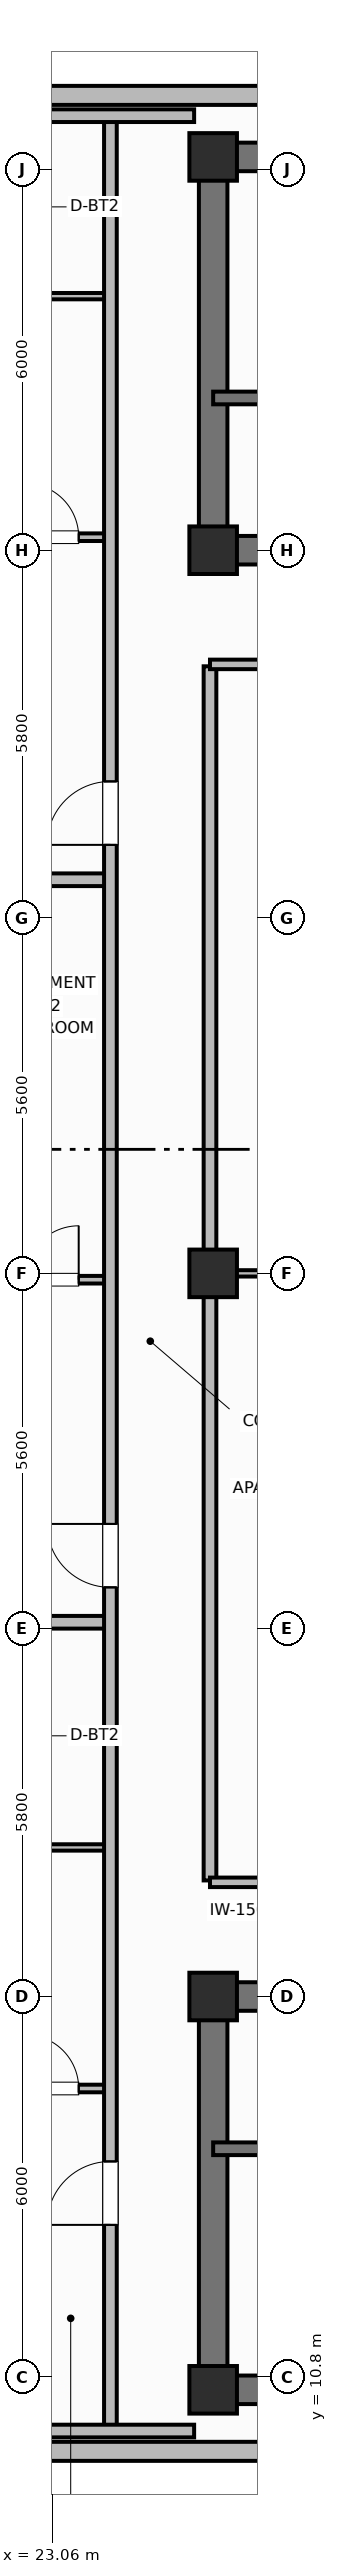
"""IFC4 building model, lengths in metres.
Left out: names, types, materials, properties, quantities, classifications, styles, units other than length and angle.
Written with IfcOpenShell. Run it as: python <this file> out.ifc"""

import sys

from ifc_helpers import new_model, si_unit, direction, frame, frame_2d, origin, origin_2d, place, context, subcontext, project, spatial, rectangle, extrude, element, fill, save


model = new_model("IFC4")
c1 = context("Model", 3, precision=1e-05, world=origin(), true_north=direction((0.0, 1.0)))
c2 = subcontext(c1, "Body", "Model", "MODEL_VIEW")
j1 = project(units=[si_unit("LENGTHUNIT", "METRE"), si_unit("PLANEANGLEUNIT", "RADIAN")], contexts=[c1])
p1 = place(None, origin())
s1 = spatial("IfcSite", under=j1, at=p1, CompositionType="ELEMENT")
p2 = place(p1, origin())
s2 = spatial("IfcBuilding", under=s1, at=p2, CompositionType="ELEMENT")
p3 = place(p2, frame((0.0, 0.0, 282.4)))
s3 = spatial("IfcBuildingStorey", under=s2, at=p3, CompositionType="ELEMENT", Elevation=282.4)
p4 = place(p3, frame((52.8, 10.6, 0.0), z_axis=(0.0, 0.0, 1.0), x_axis=(-1.0, 0.0, 0.0)))
e1 = element("IfcWall", 1, at=p4, inside=s3, PredefinedType="SHEAR", context=c2, shape_type="SweptSolid", body=[
    extrude(rectangle(XDim=27.2, YDim=0.45, at=frame_2d((13.6, 0.0))), origin(), (0.0, 0.0, 1.0), 3.7),
])
p5 = place(p3, frame((25.6, 10.825, 0.0), z_axis=(0.0, 0.0, 1.0), x_axis=(0.0, 1.0, 0.0)))
e2 = element("IfcWall", 2, at=p5, inside=s3, PredefinedType="SHEAR", context=c2, shape_type="SweptSolid", body=[
    extrude(rectangle(XDim=5.75, YDim=0.45, at=frame_2d((2.875, 0.0))), origin(), (0.0, 0.0, 1.0), 3.7),
])
p6 = place(p3, frame((25.6, 16.8, 0.0), z_axis=(0.0, 0.0, 1.0), x_axis=(1.0, 0.0, 0.0)))
e3 = element("IfcWall", 3, at=p6, inside=s3, PredefinedType="SHEAR", context=c2, shape_type="SweptSolid", body=[
    extrude(rectangle(XDim=27.2, YDim=0.45, at=frame_2d((13.6, 0.0))), origin(), (0.0, 0.0, 1.0), 3.7),
])
p7 = place(p6, frame((1.9, 0.0, 0.0)))
e4 = element("IfcOpeningElement", 4, at=p7, cuts=e3, PredefinedType="OPENING", context=c2, shape_type="SweptSolid", body=[
    extrude(rectangle(XDim=1.1, YDim=2.15, at=frame_2d((0.55, 1.075))), frame((0.0, 0.235, 0.0), z_axis=(0.0, -1.0, 0.0), x_axis=(1.0, 0.0, 0.0)), (0.0, 0.0, 1.0), 0.47),
])
p8 = place(p6, frame((13.0, 0.0, 0.0)))
e5 = element("IfcOpeningElement", 5, at=p8, cuts=e3, PredefinedType="OPENING", context=c2, shape_type="SweptSolid", body=[
    extrude(rectangle(XDim=1.2, YDim=2.15, at=frame_2d((0.6, 1.075))), frame((0.0, 0.235, 0.0), z_axis=(0.0, -1.0, 0.0), x_axis=(1.0, 0.0, 0.0)), (0.0, 0.0, 1.0), 0.47),
])
p9 = place(p6, frame((21.6, 0.0, 0.0)))
e6 = element("IfcOpeningElement", 6, at=p9, cuts=e3, PredefinedType="OPENING", context=c2, shape_type="SweptSolid", body=[
    extrude(rectangle(XDim=1.0, YDim=2.15, at=frame_2d((0.5, 1.075))), frame((0.0, 0.235, 0.0), z_axis=(0.0, -1.0, 0.0), x_axis=(1.0, 0.0, 0.0)), (0.0, 0.0, 1.0), 0.47),
])
p10 = place(p3, frame((25.6, 45.8, 0.0), z_axis=(0.0, 0.0, 1.0), x_axis=(1.0, 0.0, 0.0)))
e7 = element("IfcWall", 7, at=p10, inside=s3, PredefinedType="SHEAR", context=c2, shape_type="SweptSolid", body=[
    extrude(rectangle(XDim=27.2, YDim=0.45, at=frame_2d((13.6, 0.0))), origin(), (0.0, 0.0, 1.0), 3.7),
])
p11 = place(p3, frame((25.6, 39.825, 0.0), z_axis=(0.0, 0.0, 1.0), x_axis=(0.0, 1.0, 0.0)))
e8 = element("IfcWall", 8, at=p11, inside=s3, PredefinedType="SHEAR", context=c2, shape_type="SweptSolid", body=[
    extrude(rectangle(XDim=5.75, YDim=0.45, at=frame_2d((2.875, 0.0))), origin(), (0.0, 0.0, 1.0), 3.7),
])
p12 = place(p3, frame((52.8, 39.6, 0.0), z_axis=(0.0, 0.0, 1.0), x_axis=(-1.0, 0.0, 0.0)))
e9 = element("IfcWall", 9, at=p12, inside=s3, PredefinedType="SHEAR", context=c2, shape_type="SweptSolid", body=[
    extrude(rectangle(XDim=27.2, YDim=0.45, at=frame_2d((13.6, 0.0))), origin(), (0.0, 0.0, 1.0), 3.7),
])
p13 = place(p12, frame((24.2, 0.0, 0.0)))
e10 = element("IfcOpeningElement", 10, at=p13, cuts=e9, PredefinedType="OPENING", context=c2, shape_type="SweptSolid", body=[
    extrude(rectangle(XDim=1.1, YDim=2.15, at=frame_2d((0.55, 1.075))), frame((0.0, 0.235, 0.0), z_axis=(0.0, -1.0, 0.0), x_axis=(1.0, 0.0, 0.0)), (0.0, 0.0, 1.0), 0.47),
])
p14 = place(p12, frame((15.1, 0.0, 0.0)))
e11 = element("IfcOpeningElement", 11, at=p14, cuts=e9, PredefinedType="OPENING", context=c2, shape_type="SweptSolid", body=[
    extrude(rectangle(XDim=1.2, YDim=2.15, at=frame_2d((0.6, 1.075))), frame((0.0, 0.235, 0.0), z_axis=(0.0, -1.0, 0.0), x_axis=(1.0, 0.0, 0.0)), (0.0, 0.0, 1.0), 0.47),
])
p15 = place(p12, frame((11.6, 0.0, 0.0)))
e12 = element("IfcOpeningElement", 12, at=p15, cuts=e9, PredefinedType="OPENING", context=c2, shape_type="SweptSolid", body=[
    extrude(rectangle(XDim=0.9, YDim=2.1, at=frame_2d((0.45, 1.05))), frame((0.0, 0.235, 0.0), z_axis=(0.0, -1.0, 0.0), x_axis=(1.0, 0.0, 0.0)), (0.0, 0.0, 1.0), 0.47),
])
p16 = place(p12, frame((7.35, 0.0, 0.0)))
e13 = element("IfcOpeningElement", 13, at=p16, cuts=e9, PredefinedType="OPENING", context=c2, shape_type="SweptSolid", body=[
    extrude(rectangle(XDim=0.85, YDim=2.1, at=frame_2d((0.425, 1.05))), frame((0.0, 0.235, 0.0), z_axis=(0.0, -1.0, 0.0), x_axis=(1.0, 0.0, 0.0)), (0.0, 0.0, 1.0), 0.47),
])
p17 = place(p12, frame((4.2, 0.0, 0.0)))
e14 = element("IfcOpeningElement", 14, at=p17, cuts=e9, PredefinedType="OPENING", context=c2, shape_type="SweptSolid", body=[
    extrude(rectangle(XDim=1.3, YDim=2.2, at=frame_2d((0.65, 1.1))), frame((0.0, 0.235, 0.0), z_axis=(0.0, -1.0, 0.0), x_axis=(1.0, 0.0, 0.0)), (0.0, 0.0, 1.0), 0.47),
])
for number, where, z_axis, x_axis in (
    (15, (25.6, 10.6, 0.0), (0.0, 0.0, 1.0), (1.0, 0.0, 0.0)),
    (16, (25.6, 16.8, 0.0), (0.0, 0.0, 1.0), (1.0, 0.0, 0.0)),
    (17, (25.6, 39.6, 0.0), (0.0, 0.0, 1.0), (1.0, 0.0, 0.0)),
    (18, (25.6, 45.8, 0.0), (0.0, 0.0, 1.0), (1.0, 0.0, 0.0)),
    (19, (25.6, 28.2, 0.0), (0.0, 0.0, 1.0), (1.0, 0.0, 0.0)),
):
    element("IfcColumn", number, at=place(p3, frame(where, z_axis=z_axis, x_axis=x_axis)), inside=s3, PredefinedType="COLUMN", context=c2, shape_type="SweptSolid", body=[
        extrude(rectangle(XDim=0.75, YDim=0.75, at=origin_2d()), origin(), (0.0, 0.0, 1.0), 3.7),
    ])
p18 = place(p3, frame((22.56, 9.63, 0.0), z_axis=(0.0, 0.0, 1.0), x_axis=(1.0, 0.0, 0.0)))
e20 = element("IfcWall", 20, at=p18, inside=s3, PredefinedType="SOLIDWALL", context=c2, shape_type="SweptSolid", body=[
    extrude(rectangle(XDim=33.28, YDim=0.3, at=frame_2d((16.64, 0.0))), origin(), (0.0, 0.0, 1.0), 2.73),
])
p19 = place(p18, frame((5.18, 0.0, 0.71)))
e21 = element("IfcOpeningElement", 21, at=p19, cuts=e20, PredefinedType="OPENING", context=c2, shape_type="SweptSolid", body=[
    extrude(rectangle(XDim=1.6, YDim=1.9, at=frame_2d((0.8, 0.95))), frame((0.0, 0.16, 0.0), z_axis=(0.0, -1.0, 0.0), x_axis=(1.0, 0.0, 0.0)), (0.0, 0.0, 1.0), 0.32),
])
p20 = place(p18, frame((8.733, 0.0, 0.71)))
e22 = element("IfcOpeningElement", 22, at=p20, cuts=e20, PredefinedType="OPENING", context=c2, shape_type="SweptSolid", body=[
    extrude(rectangle(XDim=1.6, YDim=1.9, at=frame_2d((0.8, 0.95))), frame((0.0, 0.16, 0.0), z_axis=(0.0, -1.0, 0.0), x_axis=(1.0, 0.0, 0.0)), (0.0, 0.0, 1.0), 0.32),
])
p21 = place(p18, frame((15.84, 0.0, 0.71)))
e23 = element("IfcOpeningElement", 23, at=p21, cuts=e20, PredefinedType="OPENING", context=c2, shape_type="SweptSolid", body=[
    extrude(rectangle(XDim=1.6, YDim=1.9, at=frame_2d((0.8, 0.95))), frame((0.0, 0.16, 0.0), z_axis=(0.0, -1.0, 0.0), x_axis=(1.0, 0.0, 0.0)), (0.0, 0.0, 1.0), 0.32),
])
p22 = place(p18, frame((22.947, 0.0, 0.71)))
e24 = element("IfcOpeningElement", 24, at=p22, cuts=e20, PredefinedType="OPENING", context=c2, shape_type="SweptSolid", body=[
    extrude(rectangle(XDim=1.6, YDim=1.9, at=frame_2d((0.8, 0.95))), frame((0.0, 0.16, 0.0), z_axis=(0.0, -1.0, 0.0), x_axis=(1.0, 0.0, 0.0)), (0.0, 0.0, 1.0), 0.32),
])
p23 = place(p18, frame((26.5, 0.0, 0.71)))
e25 = element("IfcOpeningElement", 25, at=p23, cuts=e20, PredefinedType="OPENING", context=c2, shape_type="SweptSolid", body=[
    extrude(rectangle(XDim=1.6, YDim=1.9, at=frame_2d((0.8, 0.95))), frame((0.0, 0.16, 0.0), z_axis=(0.0, -1.0, 0.0), x_axis=(1.0, 0.0, 0.0)), (0.0, 0.0, 1.0), 0.32),
])
p24 = place(p3, frame((55.84, 46.77, 0.0), z_axis=(0.0, 0.0, 1.0), x_axis=(-1.0, 0.0, 0.0)))
e26 = element("IfcWall", 26, at=p24, inside=s3, PredefinedType="SOLIDWALL", context=c2, shape_type="SweptSolid", body=[
    extrude(rectangle(XDim=33.28, YDim=0.3, at=frame_2d((16.64, 0.0))), origin(), (0.0, 0.0, 1.0), 2.73),
])
p25 = place(p24, frame((5.596, 0.0, 0.71)))
e27 = element("IfcOpeningElement", 27, at=p25, cuts=e26, PredefinedType="OPENING", context=c2, shape_type="SweptSolid", body=[
    extrude(rectangle(XDim=2.1, YDim=1.9, at=frame_2d((1.05, 0.95))), frame((0.0, 0.16, 0.0), z_axis=(0.0, -1.0, 0.0), x_axis=(1.0, 0.0, 0.0)), (0.0, 0.0, 1.0), 0.32),
])
p26 = place(p24, frame((9.244, 0.0, 0.71)))
e28 = element("IfcOpeningElement", 28, at=p26, cuts=e26, PredefinedType="OPENING", context=c2, shape_type="SweptSolid", body=[
    extrude(rectangle(XDim=2.1, YDim=1.9, at=frame_2d((1.05, 0.95))), frame((0.0, 0.16, 0.0), z_axis=(0.0, -1.0, 0.0), x_axis=(1.0, 0.0, 0.0)), (0.0, 0.0, 1.0), 0.32),
])
p27 = place(p24, frame((13.941, 0.0, 0.71)))
e29 = element("IfcOpeningElement", 29, at=p27, cuts=e26, PredefinedType="OPENING", context=c2, shape_type="SweptSolid", body=[
    extrude(rectangle(XDim=2.1, YDim=1.9, at=frame_2d((1.05, 0.95))), frame((0.0, 0.16, 0.0), z_axis=(0.0, -1.0, 0.0), x_axis=(1.0, 0.0, 0.0)), (0.0, 0.0, 1.0), 0.32),
])
p28 = place(p24, frame((17.239, 0.0, 0.71)))
e30 = element("IfcOpeningElement", 30, at=p28, cuts=e26, PredefinedType="OPENING", context=c2, shape_type="SweptSolid", body=[
    extrude(rectangle(XDim=2.1, YDim=1.9, at=frame_2d((1.05, 0.95))), frame((0.0, 0.16, 0.0), z_axis=(0.0, -1.0, 0.0), x_axis=(1.0, 0.0, 0.0)), (0.0, 0.0, 1.0), 0.32),
])
p29 = place(p24, frame((21.936, 0.0, 0.71)))
e31 = element("IfcOpeningElement", 31, at=p29, cuts=e26, PredefinedType="OPENING", context=c2, shape_type="SweptSolid", body=[
    extrude(rectangle(XDim=2.1, YDim=1.9, at=frame_2d((1.05, 0.95))), frame((0.0, 0.16, 0.0), z_axis=(0.0, -1.0, 0.0), x_axis=(1.0, 0.0, 0.0)), (0.0, 0.0, 1.0), 0.32),
])
p30 = place(p24, frame((25.584, 0.0, 0.71)))
e32 = element("IfcOpeningElement", 32, at=p30, cuts=e26, PredefinedType="OPENING", context=c2, shape_type="SweptSolid", body=[
    extrude(rectangle(XDim=2.1, YDim=1.9, at=frame_2d((1.05, 0.95))), frame((0.0, 0.16, 0.0), z_axis=(0.0, -1.0, 0.0), x_axis=(1.0, 0.0, 0.0)), (0.0, 0.0, 1.0), 0.32),
])
p31 = place(p3, frame((25.6, 14.4, 0.0), z_axis=(0.0, 0.0, 1.0), x_axis=(1.0, 0.0, 0.0)))
e33 = element("IfcWall", 33, at=p31, inside=s3, PredefinedType="SHEAR", context=c2, shape_type="SweptSolid", body=[
    extrude(rectangle(XDim=9.55, YDim=0.2, at=frame_2d((4.775, 0.0))), origin(), (0.0, 0.0, 1.0), 3.7),
])
p32 = place(p31, frame((1.05, 0.0, 0.0)))
e34 = element("IfcOpeningElement", 34, at=p32, cuts=e33, PredefinedType="OPENING", context=c2, shape_type="SweptSolid", body=[
    extrude(rectangle(XDim=1.1, YDim=2.15, at=frame_2d((0.55, 1.075))), frame((0.0, 0.11, 0.0), z_axis=(0.0, -1.0, 0.0), x_axis=(1.0, 0.0, 0.0)), (0.0, 0.0, 1.0), 0.22),
])
p33 = place(p3, frame((35.15, 42.0, 0.0), z_axis=(0.0, 0.0, 1.0), x_axis=(-1.0, 0.0, 0.0)))
e35 = element("IfcWall", 35, at=p33, inside=s3, PredefinedType="SHEAR", context=c2, shape_type="SweptSolid", body=[
    extrude(rectangle(XDim=9.55, YDim=0.2, at=frame_2d((4.775, 0.0))), origin(), (0.0, 0.0, 1.0), 3.7),
])
p34 = place(p33, frame((7.25, 0.0, 0.0)))
e36 = element("IfcOpeningElement", 36, at=p34, cuts=e35, PredefinedType="OPENING", context=c2, shape_type="SweptSolid", body=[
    extrude(rectangle(XDim=1.1, YDim=2.15, at=frame_2d((0.55, 1.075))), frame((0.0, 0.11, 0.0), z_axis=(0.0, -1.0, 0.0), x_axis=(1.0, 0.0, 0.0)), (0.0, 0.0, 1.0), 0.22),
])
p35 = place(p3, frame((25.55, 18.63, 0.0), z_axis=(0.0, 0.0, 1.0), x_axis=(0.0, 1.0, 0.0)))
e37 = element("IfcWall", 37, at=p35, inside=s3, PredefinedType="PARTITIONING", context=c2, shape_type="SweptSolid", body=[
    extrude(rectangle(XDim=19.14, YDim=0.2, at=frame_2d((9.57, 0.0))), origin(), (0.0, 0.0, 1.0), 2.56),
])
for number, where, z_axis, x_axis in (
    (38, (25.55, 18.6, 0.0), (0.0, 0.0, 1.0), (1.0, 0.0, 0.0)),
    (39, (25.55, 37.8, 0.0), (0.0, 0.0, 1.0), (1.0, 0.0, 0.0)),
):
    element("IfcWall", number, at=place(p3, frame(where, z_axis=z_axis, x_axis=x_axis)), inside=s3, PredefinedType="PARTITIONING", context=c2, shape_type="SweptSolid", body=[
        extrude(rectangle(XDim=2.7, YDim=0.15, at=frame_2d((1.35, 0.0))), origin(), (0.0, 0.0, 1.0), 2.56),
    ])
p36 = place(p3, frame((25.6, 28.2, 0.0), z_axis=(0.0, 0.0, 1.0), x_axis=(1.0, 0.0, 0.0)))
e40 = element("IfcWall", 40, at=p36, inside=s3, PredefinedType="PARTITIONING", context=c2, shape_type="SweptSolid", body=[
    extrude(rectangle(XDim=2.66, YDim=0.1, at=frame_2d((1.33, 0.0))), origin(), (0.0, 0.0, 1.0), 2.56),
])
p37 = place(p3, frame((22.03, 15.35, 0.0), z_axis=(0.0, 0.0, 1.0), x_axis=(1.0, 0.0, 0.0)))
e41 = element("IfcWall", 41, at=p37, inside=s3, PredefinedType="PARTITIONING", context=c2, shape_type="SweptSolid", body=[
    extrude(rectangle(XDim=1.95, YDim=0.12, at=frame_2d((0.975, 0.0))), origin(), (0.0, 0.0, 1.0), 2.56),
])
p38 = place(p37, frame((0.6, 0.0, 0.0)))
e42 = element("IfcOpeningElement", 42, at=p38, cuts=e41, PredefinedType="OPENING", context=c2, shape_type="SweptSolid", body=[
    extrude(rectangle(XDim=0.85, YDim=2.1, at=frame_2d((0.425, 1.05))), frame((0.0, 0.07, 0.0), z_axis=(0.0, -1.0, 0.0), x_axis=(1.0, 0.0, 0.0)), (0.0, 0.0, 1.0), 0.14),
])
p39 = place(p3, frame((22.03, 19.15, 0.0), z_axis=(0.0, 0.0, 1.0), x_axis=(1.0, 0.0, 0.0)))
e43 = element("IfcWall", 43, at=p39, inside=s3, PredefinedType="PARTITIONING", context=c2, shape_type="SweptSolid", body=[
    extrude(rectangle(XDim=1.95, YDim=0.1, at=frame_2d((0.975, 0.0))), origin(), (0.0, 0.0, 1.0), 2.56),
])
p40 = place(p3, frame((19.53, 22.7, 0.0), z_axis=(0.0, 0.0, 1.0), x_axis=(1.0, 0.0, 0.0)))
e44 = element("IfcWall", 44, at=p40, inside=s3, PredefinedType="PARTITIONING", context=c2, shape_type="SweptSolid", body=[
    extrude(rectangle(XDim=4.45, YDim=0.2, at=frame_2d((2.225, 0.0))), origin(), (0.0, 0.0, 1.0), 2.56),
])
p41 = place(p3, frame((22.03, 28.1, 0.0), z_axis=(0.0, 0.0, 1.0), x_axis=(1.0, 0.0, 0.0)))
e45 = element("IfcWall", 45, at=p41, inside=s3, PredefinedType="PARTITIONING", context=c2, shape_type="SweptSolid", body=[
    extrude(rectangle(XDim=1.95, YDim=0.12, at=frame_2d((0.975, 0.0))), origin(), (0.0, 0.0, 1.0), 2.56),
])
p42 = place(p41, frame((0.6, 0.0, 0.0)))
e46 = element("IfcOpeningElement", 46, at=p42, cuts=e45, PredefinedType="OPENING", context=c2, shape_type="SweptSolid", body=[
    extrude(rectangle(XDim=0.85, YDim=2.1, at=frame_2d((0.425, 1.05))), frame((0.0, 0.07, 0.0), z_axis=(0.0, -1.0, 0.0), x_axis=(1.0, 0.0, 0.0)), (0.0, 0.0, 1.0), 0.14),
])
p43 = place(p3, frame((19.53, 34.405, 0.0), z_axis=(0.0, 0.0, 1.0), x_axis=(1.0, 0.0, 0.0)))
e47 = element("IfcWall", 47, at=p43, inside=s3, PredefinedType="PARTITIONING", context=c2, shape_type="SweptSolid", body=[
    extrude(rectangle(XDim=4.45, YDim=0.2, at=frame_2d((2.225, 0.0))), origin(), (0.0, 0.0, 1.0), 2.56),
])
p44 = place(p3, frame((22.03, 39.805, 0.0), z_axis=(0.0, 0.0, 1.0), x_axis=(1.0, 0.0, 0.0)))
e48 = element("IfcWall", 48, at=p44, inside=s3, PredefinedType="PARTITIONING", context=c2, shape_type="SweptSolid", body=[
    extrude(rectangle(XDim=1.95, YDim=0.12, at=frame_2d((0.975, 0.0))), origin(), (0.0, 0.0, 1.0), 2.56),
])
p45 = place(p44, frame((0.6, 0.0, 0.0)))
e49 = element("IfcOpeningElement", 49, at=p45, cuts=e48, PredefinedType="OPENING", context=c2, shape_type="SweptSolid", body=[
    extrude(rectangle(XDim=0.85, YDim=2.1, at=frame_2d((0.425, 1.05))), frame((0.0, 0.07, 0.0), z_axis=(0.0, -1.0, 0.0), x_axis=(1.0, 0.0, 0.0)), (0.0, 0.0, 1.0), 0.14),
])
p46 = place(p3, frame((22.03, 43.605, 0.0), z_axis=(0.0, 0.0, 1.0), x_axis=(1.0, 0.0, 0.0)))
e50 = element("IfcWall", 50, at=p46, inside=s3, PredefinedType="PARTITIONING", context=c2, shape_type="SweptSolid", body=[
    extrude(rectangle(XDim=1.95, YDim=0.1, at=frame_2d((0.975, 0.0))), origin(), (0.0, 0.0, 1.0), 2.56),
])
p47 = place(p3, frame((23.98, 9.95, 0.0), z_axis=(0.0, 0.0, 1.0), x_axis=(0.0, 1.0, 0.0)))
e51 = element("IfcWall", 51, at=p47, inside=s3, PredefinedType="PARTITIONING", context=c2, shape_type="SweptSolid", body=[
    extrude(rectangle(XDim=36.5, YDim=0.2, at=frame_2d((18.25, 0.0))), origin(), (0.0, 0.0, 1.0), 2.56),
])
p48 = place(p47, frame((3.25, 0.0, 0.0)))
e52 = element("IfcOpeningElement", 52, at=p48, cuts=e51, PredefinedType="OPENING", context=c2, shape_type="SweptSolid", body=[
    extrude(rectangle(XDim=1.0, YDim=2.15, at=frame_2d((0.5, 1.075))), frame((0.0, 0.11, 0.0), z_axis=(0.0, -1.0, 0.0), x_axis=(1.0, 0.0, 0.0)), (0.0, 0.0, 1.0), 0.22),
])
p49 = place(p47, frame((13.3, 0.0, 0.0)))
e53 = element("IfcOpeningElement", 53, at=p49, cuts=e51, PredefinedType="OPENING", context=c2, shape_type="SweptSolid", body=[
    extrude(rectangle(XDim=1.0, YDim=2.15, at=frame_2d((0.5, 1.075))), frame((0.0, 0.11, 0.0), z_axis=(0.0, -1.0, 0.0), x_axis=(1.0, 0.0, 0.0)), (0.0, 0.0, 1.0), 0.22),
])
p50 = place(p47, frame((25.005, 0.0, 0.0)))
e54 = element("IfcOpeningElement", 54, at=p50, cuts=e51, PredefinedType="OPENING", context=c2, shape_type="SweptSolid", body=[
    extrude(rectangle(XDim=1.0, YDim=2.15, at=frame_2d((0.5, 1.075))), frame((0.0, 0.11, 0.0), z_axis=(0.0, -1.0, 0.0), x_axis=(1.0, 0.0, 0.0)), (0.0, 0.0, 1.0), 0.22),
])
for number, where, z_axis, x_axis in (
    (55, (21.546, 9.95, 0.0), (0.0, 0.0, 1.0), (1.0, 0.0, 0.0)),
    (56, (21.546, 46.45, 0.0), (0.0, 0.0, 1.0), (1.0, 0.0, 0.0)),
):
    element("IfcWall", number, at=place(p3, frame(where, z_axis=z_axis, x_axis=x_axis)), inside=s3, PredefinedType="PARTITIONING", context=c2, shape_type="SweptSolid", body=[
        extrude(rectangle(XDim=3.754, YDim=0.2, at=frame_2d((1.877, 0.0))), origin(), (0.0, 0.0, 1.0), 2.56),
    ])
p51 = place(p38, origin())
e57 = element("IfcDoor", 57, at=p51, inside=s3, OperationType="SINGLE_SWING_LEFT", PredefinedType="DOOR", context=c2, shape_type="SweptSolid", body=[
    extrude(rectangle(XDim=0.85, YDim=2.1, at=frame_2d((0.425, 1.05))), frame((0.0, 0.025, 0.0), z_axis=(0.0, -1.0, 0.0), x_axis=(1.0, 0.0, 0.0)), (0.0, 0.0, 1.0), 0.05),
])
fill(e42, e57)
p52 = place(p42, origin())
e58 = element("IfcDoor", 58, at=p52, inside=s3, OperationType="SINGLE_SWING_RIGHT", PredefinedType="DOOR", context=c2, shape_type="SweptSolid", body=[
    extrude(rectangle(XDim=0.85, YDim=2.1, at=frame_2d((0.425, 1.05))), frame((0.0, 0.025, 0.0), z_axis=(0.0, -1.0, 0.0), x_axis=(1.0, 0.0, 0.0)), (0.0, 0.0, 1.0), 0.05),
])
fill(e46, e58)
p53 = place(p45, origin())
e59 = element("IfcDoor", 59, at=p53, inside=s3, OperationType="SINGLE_SWING_LEFT", PredefinedType="DOOR", context=c2, shape_type="SweptSolid", body=[
    extrude(rectangle(XDim=0.85, YDim=2.1, at=frame_2d((0.425, 1.05))), frame((0.0, 0.025, 0.0), z_axis=(0.0, -1.0, 0.0), x_axis=(1.0, 0.0, 0.0)), (0.0, 0.0, 1.0), 0.05),
])
fill(e49, e59)
p54 = place(p48, origin())
e60 = element("IfcDoor", 60, at=p54, inside=s3, OperationType="SINGLE_SWING_LEFT", PredefinedType="DOOR", context=c2, shape_type="SweptSolid", body=[
    extrude(rectangle(XDim=1.0, YDim=2.15, at=frame_2d((0.5, 1.075))), frame((0.0, 0.025, 0.0), z_axis=(0.0, -1.0, 0.0), x_axis=(1.0, 0.0, 0.0)), (0.0, 0.0, 1.0), 0.05),
])
fill(e52, e60)
p55 = place(p49, origin())
e61 = element("IfcDoor", 61, at=p55, inside=s3, OperationType="SINGLE_SWING_RIGHT", PredefinedType="DOOR", context=c2, shape_type="SweptSolid", body=[
    extrude(rectangle(XDim=1.0, YDim=2.15, at=frame_2d((0.5, 1.075))), frame((0.0, 0.025, 0.0), z_axis=(0.0, -1.0, 0.0), x_axis=(1.0, 0.0, 0.0)), (0.0, 0.0, 1.0), 0.05),
])
fill(e53, e61)
p56 = place(p50, origin())
e62 = element("IfcDoor", 62, at=p56, inside=s3, OperationType="SINGLE_SWING_LEFT", PredefinedType="DOOR", context=c2, shape_type="SweptSolid", body=[
    extrude(rectangle(XDim=1.0, YDim=2.15, at=frame_2d((0.5, 1.075))), frame((0.0, 0.025, 0.0), z_axis=(0.0, -1.0, 0.0), x_axis=(1.0, 0.0, 0.0)), (0.0, 0.0, 1.0), 0.05),
])
fill(e54, e62)
save(model, sys.argv[1])
